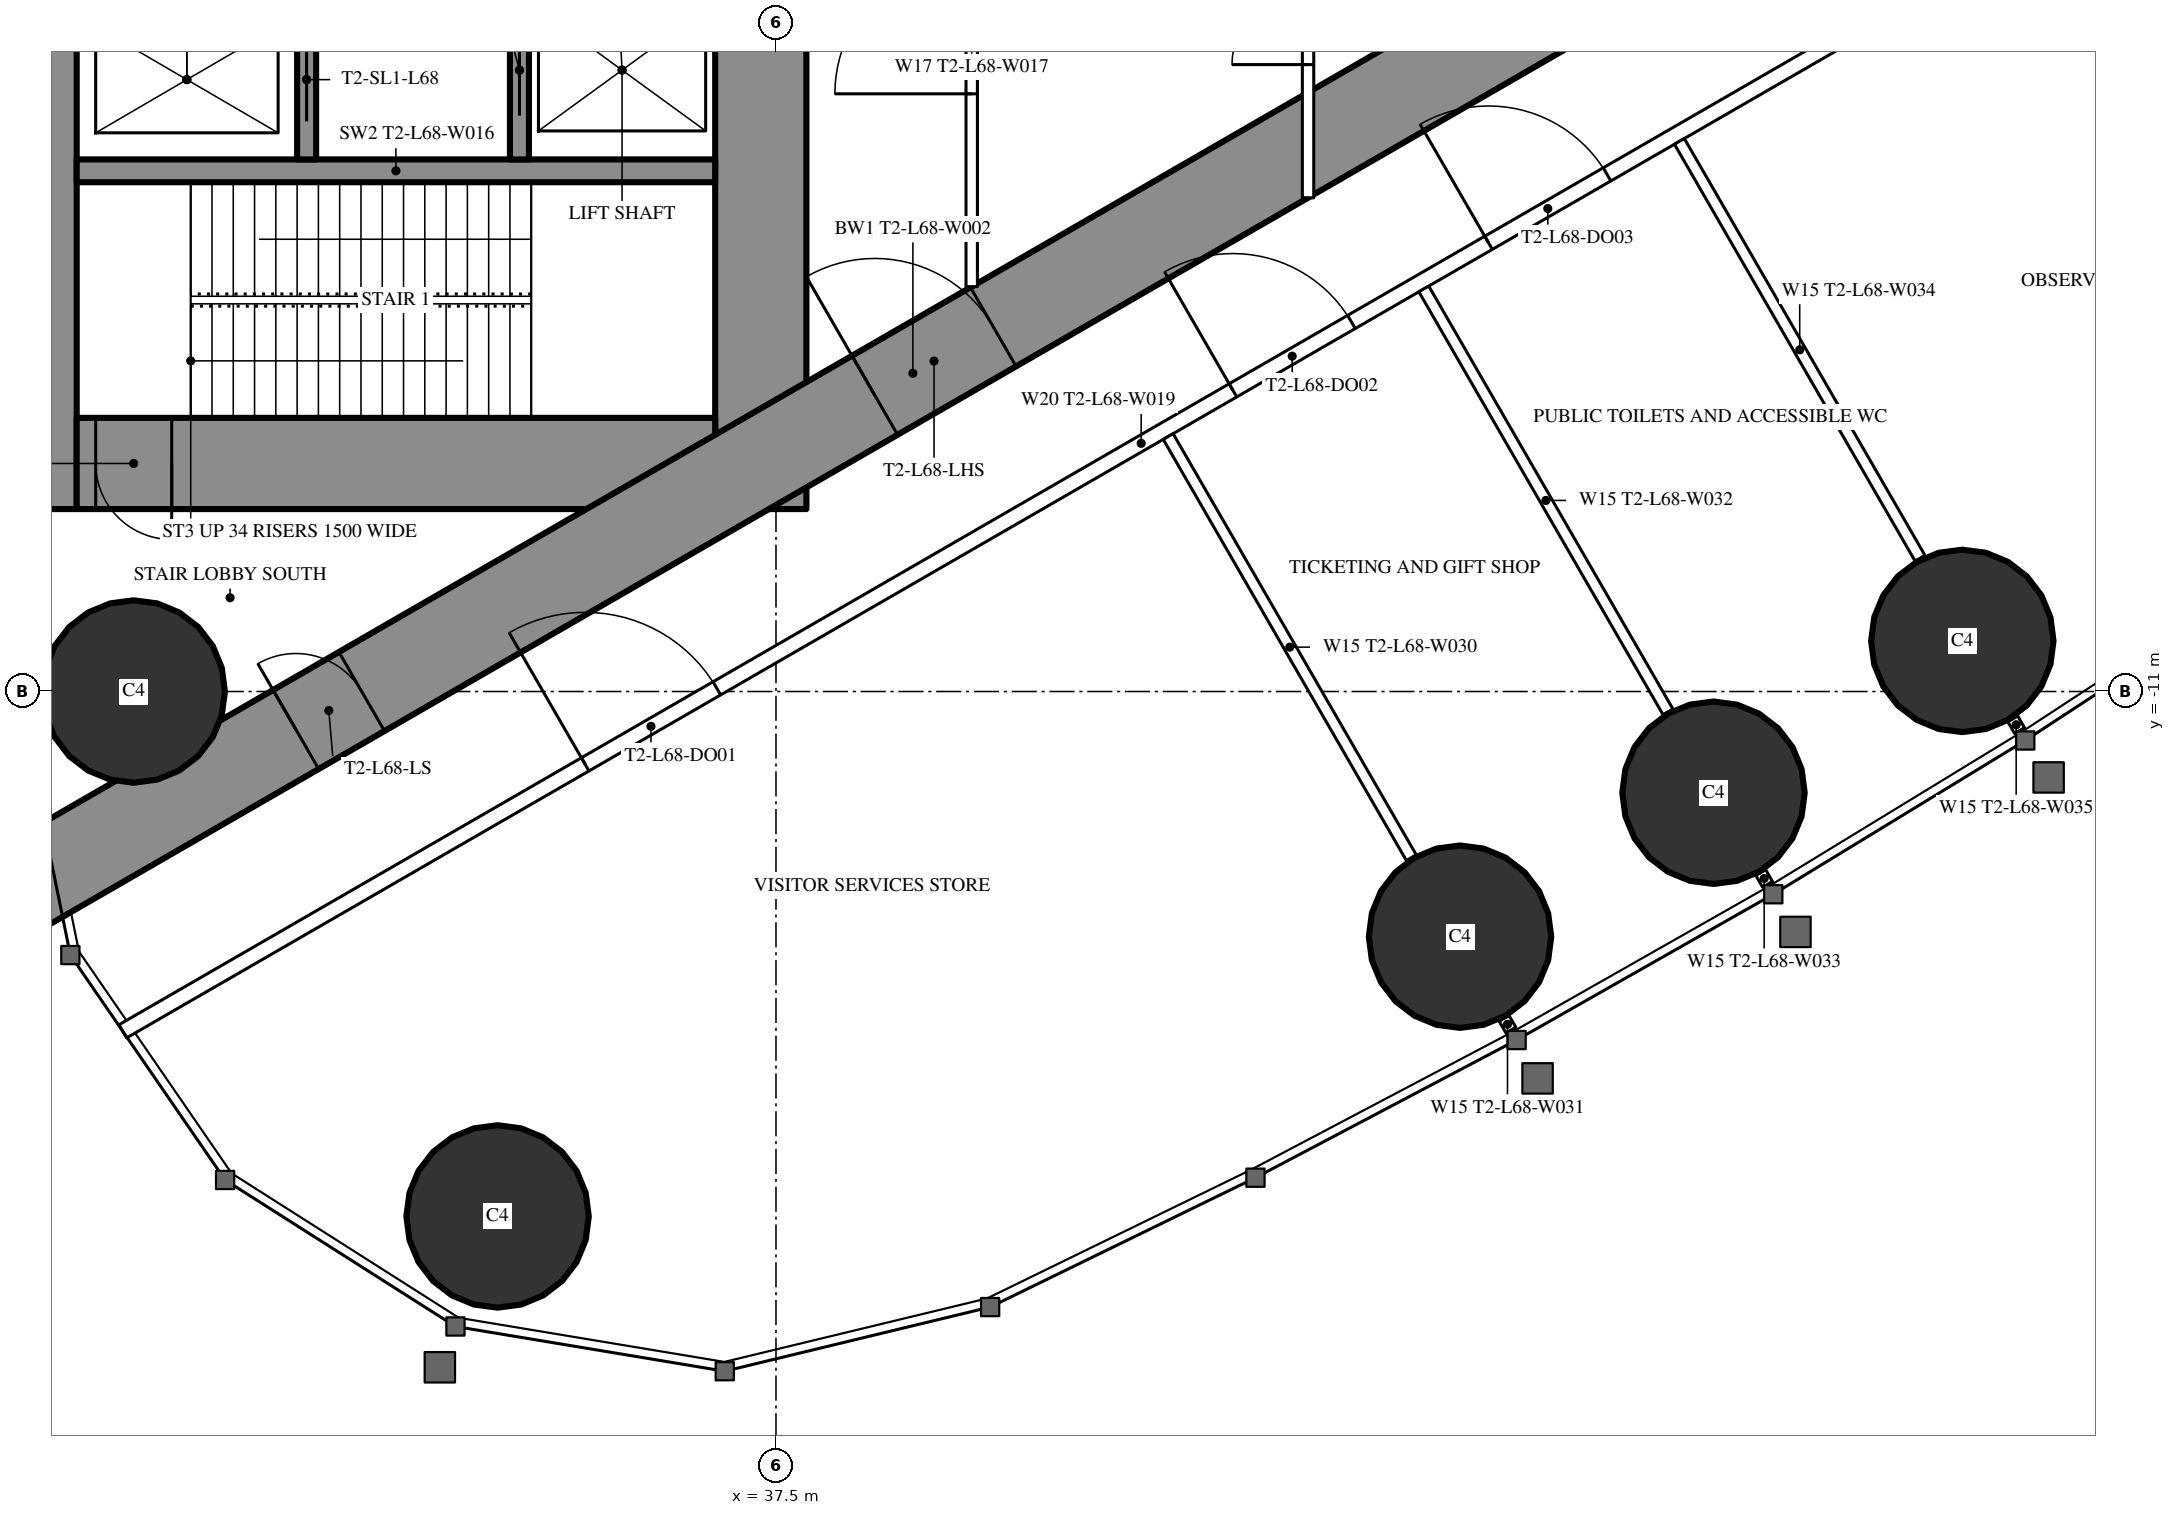
"""IFC4 building model, lengths in metres.
Left out: names, types, materials, properties, quantities, classifications, styles, units other than length and angle.
Written with IfcOpenShell. Run it as: python <this file> out.ifc"""

import sys

from ifc_helpers import new_model, si_unit, direction, frame, frame_2d, origin, origin_2d, place, context, subcontext, project, spatial, rectangle, circle, extrude, element, fill, save


model = new_model("IFC4")
c1 = context("Model", 3, precision=1e-05, world=origin(), true_north=direction((0.0, 1.0)))
c2 = subcontext(c1, "Body", "Model", "MODEL_VIEW")
j1 = project(units=[si_unit("LENGTHUNIT", "METRE"), si_unit("PLANEANGLEUNIT", "RADIAN")], contexts=[c1])
p1 = place(None, origin())
s1 = spatial("IfcSite", under=j1, at=p1, CompositionType="ELEMENT")
p2 = place(p1, origin())
s2 = spatial("IfcBuilding", under=s1, at=p2, CompositionType="ELEMENT")
p3 = place(p2, frame((0.0, 0.0, 257.3)))
s3 = spatial("IfcBuildingStorey", under=s2, at=p3, CompositionType="ELEMENT", Elevation=257.3)
for number, where, z_axis, x_axis in (
    (1, (33.837, -17.906, 0.0), (0.0, 0.0, 1.0), (1.0, 0.0, 0.0)),
    (2, (29.05, -11.0, 0.0), (0.0, 0.0, 1.0), (1.0, 0.0, 0.0)),
    (3, (46.499, -14.226, 0.0), (0.0, 0.0, 1.0), (1.0, 0.0, 0.0)),
    (4, (49.834, -12.332, 0.0), (0.0, 0.0, 1.0), (1.0, 0.0, 0.0)),
    (5, (53.108, -10.334, 0.0), (0.0, 0.0, 1.0), (1.0, 0.0, 0.0)),
):
    element("IfcColumn", number, at=place(p3, frame(where, z_axis=z_axis, x_axis=x_axis)), inside=s3, PredefinedType="COLUMN", context=c2, shape_type="SweptSolid", body=[
        extrude(circle(Radius=1.2, at=origin_2d()), origin(), (0.0, 0.0, 1.0), 6.0),
    ])
p4 = place(p3, frame((27.9, -8.6, 0.0), z_axis=(0.0, 0.0, 1.0), x_axis=(0.0, 1.0, 0.0)))
e6 = element("IfcWall", 6, at=p4, inside=s3, PredefinedType="SHEAR", context=c2, shape_type="SweptSolid", body=[
    extrude(rectangle(XDim=17.2, YDim=0.8, at=frame_2d((8.6, 0.0))), origin(), (0.0, 0.0, 1.0), 6.0),
])
p5 = place(p4, frame((9.35, 0.0, 0.0)))
e7 = element("IfcOpeningElement", 7, at=p5, cuts=e6, PredefinedType="OPENING", context=c2, shape_type="SweptSolid", body=[
    extrude(rectangle(XDim=0.9, YDim=2.2, at=frame_2d((0.45, 1.1))), frame((0.0, 0.41, 0.0), z_axis=(0.0, -1.0, 0.0), x_axis=(1.0, 0.0, 0.0)), (0.0, 0.0, 1.0), 0.82),
])
p6 = place(p3, frame((37.3, -8.6, 0.0), z_axis=(0.0, 0.0, 1.0), x_axis=(0.0, 1.0, 0.0)))
e8 = element("IfcWall", 8, at=p6, inside=s3, PredefinedType="SHEAR", context=c2, shape_type="SweptSolid", body=[
    extrude(rectangle(XDim=17.2, YDim=1.2, at=frame_2d((8.6, 0.0))), origin(), (0.0, 0.0, 1.0), 6.0),
])
p7 = place(p6, frame((7.7, 0.0, 0.0)))
e9 = element("IfcOpeningElement", 9, at=p7, cuts=e8, PredefinedType="OPENING", context=c2, shape_type="SweptSolid", body=[
    extrude(rectangle(XDim=1.8, YDim=2.2, at=frame_2d((0.9, 1.1))), frame((0.0, 0.61, 0.0), z_axis=(0.0, -1.0, 0.0), x_axis=(1.0, 0.0, 0.0)), (0.0, 0.0, 1.0), 1.22),
])
p8 = place(p3, frame((28.3, -8.0, 0.0), z_axis=(0.0, 0.0, 1.0), x_axis=(1.0, 0.0, 0.0)))
e10 = element("IfcWall", 10, at=p8, inside=s3, PredefinedType="SHEAR", context=c2, shape_type="SweptSolid", body=[
    extrude(rectangle(XDim=8.4, YDim=1.2, at=frame_2d((4.2, 0.0))), origin(), (0.0, 0.0, 1.0), 6.0),
])
p9 = place(p8, frame((0.25, 0.0, 0.0)))
e11 = element("IfcOpeningElement", 11, at=p9, cuts=e10, PredefinedType="OPENING", context=c2, shape_type="SweptSolid", body=[
    extrude(rectangle(XDim=1.0, YDim=2.2, at=frame_2d((0.5, 1.1))), frame((0.0, 0.61, 0.0), z_axis=(0.0, -1.0, 0.0), x_axis=(1.0, 0.0, 0.0)), (0.0, 0.0, 1.0), 1.22),
])
p10 = place(p3, frame((28.3, -4.15, 0.0), z_axis=(0.0, 0.0, 1.0), x_axis=(1.0, 0.0, 0.0)))
e12 = element("IfcWall", 12, at=p10, inside=s3, PredefinedType="SHEAR", context=c2, shape_type="SweptSolid", body=[
    extrude(rectangle(XDim=8.4, YDim=0.3, at=frame_2d((4.2, 0.0))), origin(), (0.0, 0.0, 1.0), 6.0),
])
p11 = place(p3, frame((31.325, -4.0, 0.0), z_axis=(0.0, 0.0, 1.0), x_axis=(0.0, 1.0, 0.0)))
e13 = element("IfcWall", 13, at=p11, inside=s3, PredefinedType="SHEAR", context=c2, shape_type="SweptSolid", body=[
    extrude(rectangle(XDim=2.1, YDim=0.25, at=frame_2d((1.05, 0.0))), origin(), (0.0, 0.0, 1.0), 6.0),
])
p12 = place(p11, frame((0.5, 0.0, 0.0)))
e14 = element("IfcOpeningElement", 14, at=p12, cuts=e13, PredefinedType="OPENING", context=c2, shape_type="SweptSolid", body=[
    extrude(rectangle(XDim=1.1, YDim=2.2, at=frame_2d((0.55, 1.1))), frame((0.0, 0.135, 0.0), z_axis=(0.0, -1.0, 0.0), x_axis=(1.0, 0.0, 0.0)), (0.0, 0.0, 1.0), 0.27),
])
p13 = place(p3, frame((34.125, -4.0, 0.0), z_axis=(0.0, 0.0, 1.0), x_axis=(0.0, 1.0, 0.0)))
e15 = element("IfcWall", 15, at=p13, inside=s3, PredefinedType="SHEAR", context=c2, shape_type="SweptSolid", body=[
    extrude(rectangle(XDim=2.35, YDim=0.25, at=frame_2d((1.175, 0.0))), origin(), (0.0, 0.0, 1.0), 6.0),
])
p14 = place(p13, frame((0.575, 0.0, 0.0)))
e16 = element("IfcOpeningElement", 16, at=p14, cuts=e15, PredefinedType="OPENING", context=c2, shape_type="SweptSolid", body=[
    extrude(rectangle(XDim=1.2, YDim=2.2, at=frame_2d((0.6, 1.1))), frame((0.0, 0.135, 0.0), z_axis=(0.0, -1.0, 0.0), x_axis=(1.0, 0.0, 0.0)), (0.0, 0.0, 1.0), 0.27),
])
p15 = place(p3, frame((27.2, -13.8, 0.0), z_axis=(0.0, 0.0, 1.0), x_axis=(0.866027159892, 0.499996958321, 0.0)))
e17 = element("IfcWall", 17, at=p15, inside=s3, PredefinedType="SHEAR", context=c2, shape_type="SweptSolid", body=[
    extrude(rectangle(XDim=27.947, YDim=1.2, at=frame_2d((13.973, 0.0))), origin(), (0.0, 0.0, 1.0), 6.0),
])
p16 = place(p15, frame((4.6, 0.0, 0.0)))
e18 = element("IfcOpeningElement", 18, at=p16, cuts=e17, PredefinedType="OPENING", context=c2, shape_type="SweptSolid", body=[
    extrude(rectangle(XDim=1.0, YDim=2.2, at=frame_2d((0.5, 1.1))), frame((0.0, 0.61, 0.0), z_axis=(0.0, -1.0, 0.0), x_axis=(1.0, 0.0, 0.0)), (0.0, 0.0, 1.0), 1.22),
])
p17 = place(p15, frame((13.395, 0.0, 0.0)))
e19 = element("IfcOpeningElement", 19, at=p17, cuts=e17, PredefinedType="OPENING", context=c2, shape_type="SweptSolid", body=[
    extrude(rectangle(XDim=1.8, YDim=2.2, at=frame_2d((0.9, 1.1))), frame((0.0, 0.61, 0.0), z_axis=(0.0, -1.0, 0.0), x_axis=(1.0, 0.0, 0.0)), (0.0, 0.0, 1.0), 1.22),
])
p18 = place(p3, frame((28.907, -15.47, 0.0), z_axis=(0.0, 0.0, 1.0), x_axis=(0.866023700353, 0.500002950419, 0.0)))
e20 = element("IfcWall", 20, at=p18, inside=s3, PredefinedType="PARTITIONING", context=c2, shape_type="SweptSolid", body=[
    extrude(rectangle(XDim=30.941, YDim=0.2, at=frame_2d((15.47, 0.0))), origin(), (0.0, 0.0, 1.0), 5.75),
])
p19 = place(p18, frame((7.024, 0.0, 0.0)))
e21 = element("IfcOpeningElement", 21, at=p19, cuts=e20, PredefinedType="OPENING", context=c2, shape_type="SweptSolid", body=[
    extrude(rectangle(XDim=2.0, YDim=2.4, at=frame_2d((1.0, 1.2))), frame((0.0, 0.11, 0.0), z_axis=(0.0, -1.0, 0.0), x_axis=(1.0, 0.0, 0.0)), (0.0, 0.0, 1.0), 0.22),
])
p20 = place(p18, frame((16.865, 0.0, 0.0)))
e22 = element("IfcOpeningElement", 22, at=p20, cuts=e20, PredefinedType="OPENING", context=c2, shape_type="SweptSolid", body=[
    extrude(rectangle(XDim=1.8, YDim=2.2, at=frame_2d((0.9, 1.1))), frame((0.0, 0.11, 0.0), z_axis=(0.0, -1.0, 0.0), x_axis=(1.0, 0.0, 0.0)), (0.0, 0.0, 1.0), 0.22),
])
p21 = place(p18, frame((20.748, 0.0, 0.0)))
e23 = element("IfcOpeningElement", 23, at=p21, cuts=e20, PredefinedType="OPENING", context=c2, shape_type="SweptSolid", body=[
    extrude(rectangle(XDim=1.8, YDim=2.2, at=frame_2d((0.9, 1.1))), frame((0.0, 0.11, 0.0), z_axis=(0.0, -1.0, 0.0), x_axis=(1.0, 0.0, 0.0)), (0.0, 0.0, 1.0), 0.22),
])
p22 = place(p18, frame((26.152, 0.0, 0.0)))
e24 = element("IfcOpeningElement", 24, at=p22, cuts=e20, PredefinedType="OPENING", context=c2, shape_type="SweptSolid", body=[
    extrude(rectangle(XDim=2.0, YDim=2.4, at=frame_2d((1.0, 1.2))), frame((0.0, 0.11, 0.0), z_axis=(0.0, -1.0, 0.0), x_axis=(1.0, 0.0, 0.0)), (0.0, 0.0, 1.0), 0.22),
])
p23 = place(p3, frame((42.66, -7.646, 0.0), z_axis=(0.0, 0.0, 1.0), x_axis=(0.499996592859, -0.866027370889, 0.0)))
e25 = element("IfcWall", 25, at=p23, inside=s3, PredefinedType="PARTITIONING", context=c2, shape_type="SweptSolid", body=[
    extrude(rectangle(XDim=6.398, YDim=0.15, at=frame_2d((3.199, 0.0))), origin(), (0.0, 0.0, 1.0), 4.85),
])
p24 = place(p3, frame((47.079, -15.3, 0.0), z_axis=(0.0, 0.0, 1.0), x_axis=(0.499212083968, -0.866479829667, 0.0)))
e26 = element("IfcWall", 26, at=p24, inside=s3, PredefinedType="PARTITIONING", context=c2, shape_type="SweptSolid", body=[
    extrude(rectangle(XDim=0.179, YDim=0.15, at=frame_2d((0.09, 0.0))), origin(), (0.0, 0.0, 1.0), 4.85),
])
p25 = place(p3, frame((46.023, -5.704, 0.0), z_axis=(0.0, 0.0, 1.0), x_axis=(0.499984478165, -0.866034365135, 0.0)))
e27 = element("IfcWall", 27, at=p25, inside=s3, PredefinedType="PARTITIONING", context=c2, shape_type="SweptSolid", body=[
    extrude(rectangle(XDim=6.426, YDim=0.15, at=frame_2d((3.213, 0.0))), origin(), (0.0, 0.0, 1.0), 4.85),
])
p26 = place(p3, frame((50.456, -13.382, 0.0), z_axis=(0.0, 0.0, 1.0), x_axis=(0.500661834965, -0.865642955848, 0.0)))
e28 = element("IfcWall", 28, at=p26, inside=s3, PredefinedType="PARTITIONING", context=c2, shape_type="SweptSolid", body=[
    extrude(rectangle(XDim=0.18, YDim=0.15, at=frame_2d((0.09, 0.0))), origin(), (0.0, 0.0, 1.0), 4.85),
])
p27 = place(p3, frame((49.385, -3.763, 0.0), z_axis=(0.0, 0.0, 1.0), x_axis=(0.499999447814, -0.866025722589, 0.0)))
e29 = element("IfcWall", 29, at=p27, inside=s3, PredefinedType="PARTITIONING", context=c2, shape_type="SweptSolid", body=[
    extrude(rectangle(XDim=6.333, YDim=0.15, at=frame_2d((3.166, 0.0))), origin(), (0.0, 0.0, 1.0), 4.85),
])
p28 = place(p3, frame((53.771, -11.36, 0.0), z_axis=(0.0, 0.0, 1.0), x_axis=(0.499524978789, -0.866299483762, 0.0)))
e30 = element("IfcWall", 30, at=p28, inside=s3, PredefinedType="PARTITIONING", context=c2, shape_type="SweptSolid", body=[
    extrude(rectangle(XDim=0.178, YDim=0.15, at=frame_2d((0.089, 0.0))), origin(), (0.0, 0.0, 1.0), 4.85),
])
p29 = place(p3, frame((40.075, -5.674, 0.0), z_axis=(0.0, 0.0, 1.0), x_axis=(0.0, 1.0, 0.0)))
e31 = element("IfcWall", 31, at=p29, inside=s3, PredefinedType="PARTITIONING", context=c2, shape_type="SweptSolid", body=[
    extrude(rectangle(XDim=6.874, YDim=0.15, at=frame_2d((3.437, 0.0))), origin(), (0.0, 0.0, 1.0), 5.75),
])
p30 = place(p29, frame((2.537, 0.0, 0.0)))
e32 = element("IfcOpeningElement", 32, at=p30, cuts=e31, PredefinedType="OPENING", context=c2, shape_type="SweptSolid", body=[
    extrude(rectangle(XDim=1.8, YDim=2.2, at=frame_2d((0.9, 1.1))), frame((0.0, 0.085, 0.0), z_axis=(0.0, -1.0, 0.0), x_axis=(1.0, 0.0, 0.0)), (0.0, 0.0, 1.0), 0.17),
])
p31 = place(p3, frame((44.5, -4.505, 0.0), z_axis=(0.0, 0.0, 1.0), x_axis=(0.0, 1.0, 0.0)))
e33 = element("IfcWall", 33, at=p31, inside=s3, PredefinedType="PARTITIONING", context=c2, shape_type="SweptSolid", body=[
    extrude(rectangle(XDim=9.009, YDim=0.15, at=frame_2d((4.505, 0.0))), origin(), (0.0, 0.0, 1.0), 5.75),
])
p32 = place(p31, frame((1.752, 0.0, 0.0)))
e34 = element("IfcOpeningElement", 34, at=p32, cuts=e33, PredefinedType="OPENING", context=c2, shape_type="SweptSolid", body=[
    extrude(rectangle(XDim=1.0, YDim=2.2, at=frame_2d((0.5, 1.1))), frame((0.0, 0.085, 0.0), z_axis=(0.0, -1.0, 0.0), x_axis=(1.0, 0.0, 0.0)), (0.0, 0.0, 1.0), 0.17),
])
p33 = place(p31, frame((6.257, 0.0, 0.0)))
e35 = element("IfcOpeningElement", 35, at=p33, cuts=e33, PredefinedType="OPENING", context=c2, shape_type="SweptSolid", body=[
    extrude(rectangle(XDim=1.0, YDim=2.2, at=frame_2d((0.5, 1.1))), frame((0.0, 0.085, 0.0), z_axis=(0.0, -1.0, 0.0), x_axis=(1.0, 0.0, 0.0)), (0.0, 0.0, 1.0), 0.17),
])
p34 = place(p19, origin())
e36 = element("IfcDoor", 36, at=p34, inside=s3, OperationType="DOUBLE_DOOR_SINGLE_SWING", PredefinedType="DOOR", context=c2, shape_type="SweptSolid", body=[
    extrude(rectangle(XDim=2.0, YDim=2.4, at=frame_2d((1.0, 1.2))), frame((0.0, 0.025, 0.0), z_axis=(0.0, -1.0, 0.0), x_axis=(1.0, 0.0, 0.0)), (0.0, 0.0, 1.0), 0.05),
])
fill(e21, e36)
p35 = place(p20, origin())
e37 = element("IfcDoor", 37, at=p35, inside=s3, OperationType="DOUBLE_DOOR_SINGLE_SWING", PredefinedType="DOOR", context=c2, shape_type="SweptSolid", body=[
    extrude(rectangle(XDim=1.8, YDim=2.2, at=frame_2d((0.9, 1.1))), frame((0.0, 0.025, 0.0), z_axis=(0.0, -1.0, 0.0), x_axis=(1.0, 0.0, 0.0)), (0.0, 0.0, 1.0), 0.05),
])
fill(e22, e37)
p36 = place(p21, origin())
e38 = element("IfcDoor", 38, at=p36, inside=s3, OperationType="DOUBLE_DOOR_SINGLE_SWING", PredefinedType="DOOR", context=c2, shape_type="SweptSolid", body=[
    extrude(rectangle(XDim=1.8, YDim=2.2, at=frame_2d((0.9, 1.1))), frame((0.0, 0.025, 0.0), z_axis=(0.0, -1.0, 0.0), x_axis=(1.0, 0.0, 0.0)), (0.0, 0.0, 1.0), 0.05),
])
fill(e23, e38)
p37 = place(p30, origin())
e39 = element("IfcDoor", 39, at=p37, inside=s3, OperationType="DOUBLE_DOOR_SINGLE_SWING", PredefinedType="DOOR", context=c2, shape_type="SweptSolid", body=[
    extrude(rectangle(XDim=1.8, YDim=2.2, at=frame_2d((0.9, 1.1))), frame((0.0, 0.025, 0.0), z_axis=(0.0, -1.0, 0.0), x_axis=(1.0, 0.0, 0.0)), (0.0, 0.0, 1.0), 0.05),
])
fill(e32, e39)
p38 = place(p32, origin())
e40 = element("IfcDoor", 40, at=p38, inside=s3, OperationType="SINGLE_SWING_LEFT", PredefinedType="DOOR", context=c2, shape_type="SweptSolid", body=[
    extrude(rectangle(XDim=1.0, YDim=2.2, at=frame_2d((0.5, 1.1))), frame((0.0, 0.025, 0.0), z_axis=(0.0, -1.0, 0.0), x_axis=(1.0, 0.0, 0.0)), (0.0, 0.0, 1.0), 0.05),
])
fill(e34, e40)
p39 = place(p16, origin())
e41 = element("IfcDoor", 41, at=p39, inside=s3, OperationType="SINGLE_SWING_LEFT", PredefinedType="DOOR", context=c2, shape_type="SweptSolid", body=[
    extrude(rectangle(XDim=1.0, YDim=2.2, at=frame_2d((0.5, 1.1))), frame((0.0, 0.025, 0.0), z_axis=(0.0, -1.0, 0.0), x_axis=(1.0, 0.0, 0.0)), (0.0, 0.0, 1.0), 0.05),
])
fill(e18, e41)
p40 = place(p17, origin())
e42 = element("IfcDoor", 42, at=p40, inside=s3, OperationType="DOUBLE_DOOR_SINGLE_SWING", PredefinedType="DOOR", context=c2, shape_type="SweptSolid", body=[
    extrude(rectangle(XDim=1.8, YDim=2.2, at=frame_2d((0.9, 1.1))), frame((0.0, 0.025, 0.0), z_axis=(0.0, -1.0, 0.0), x_axis=(1.0, 0.0, 0.0)), (0.0, 0.0, 1.0), 0.05),
])
fill(e19, e42)
p41 = place(p9, origin())
e43 = element("IfcDoor", 43, at=p41, inside=s3, OperationType="SINGLE_SWING_RIGHT", PredefinedType="DOOR", context=c2, shape_type="SweptSolid", body=[
    extrude(rectangle(XDim=1.0, YDim=2.2, at=frame_2d((0.5, 1.1))), frame((0.0, 0.025, 0.0), z_axis=(0.0, -1.0, 0.0), x_axis=(1.0, 0.0, 0.0)), (0.0, 0.0, 1.0), 0.05),
])
fill(e11, e43)
p42 = place(p12, origin())
e44 = element("IfcDoor", 44, at=p42, inside=s3, OperationType="SLIDING_TO_LEFT", PredefinedType="USERDEFINED", context=c2, shape_type="SweptSolid", body=[
    extrude(rectangle(XDim=1.1, YDim=2.2, at=frame_2d((0.55, 1.1))), frame((0.0, 0.025, 0.0), z_axis=(0.0, -1.0, 0.0), x_axis=(1.0, 0.0, 0.0)), (0.0, 0.0, 1.0), 0.05),
])
fill(e14, e44)
p43 = place(p14, origin())
e45 = element("IfcDoor", 45, at=p43, inside=s3, OperationType="DOUBLE_DOOR_SLIDING", PredefinedType="USERDEFINED", context=c2, shape_type="SweptSolid", body=[
    extrude(rectangle(XDim=1.2, YDim=2.2, at=frame_2d((0.6, 1.1))), frame((0.0, 0.025, 0.0), z_axis=(0.0, -1.0, 0.0), x_axis=(1.0, 0.0, 0.0)), (0.0, 0.0, 1.0), 0.05),
])
fill(e16, e45)
save(model, sys.argv[1])
